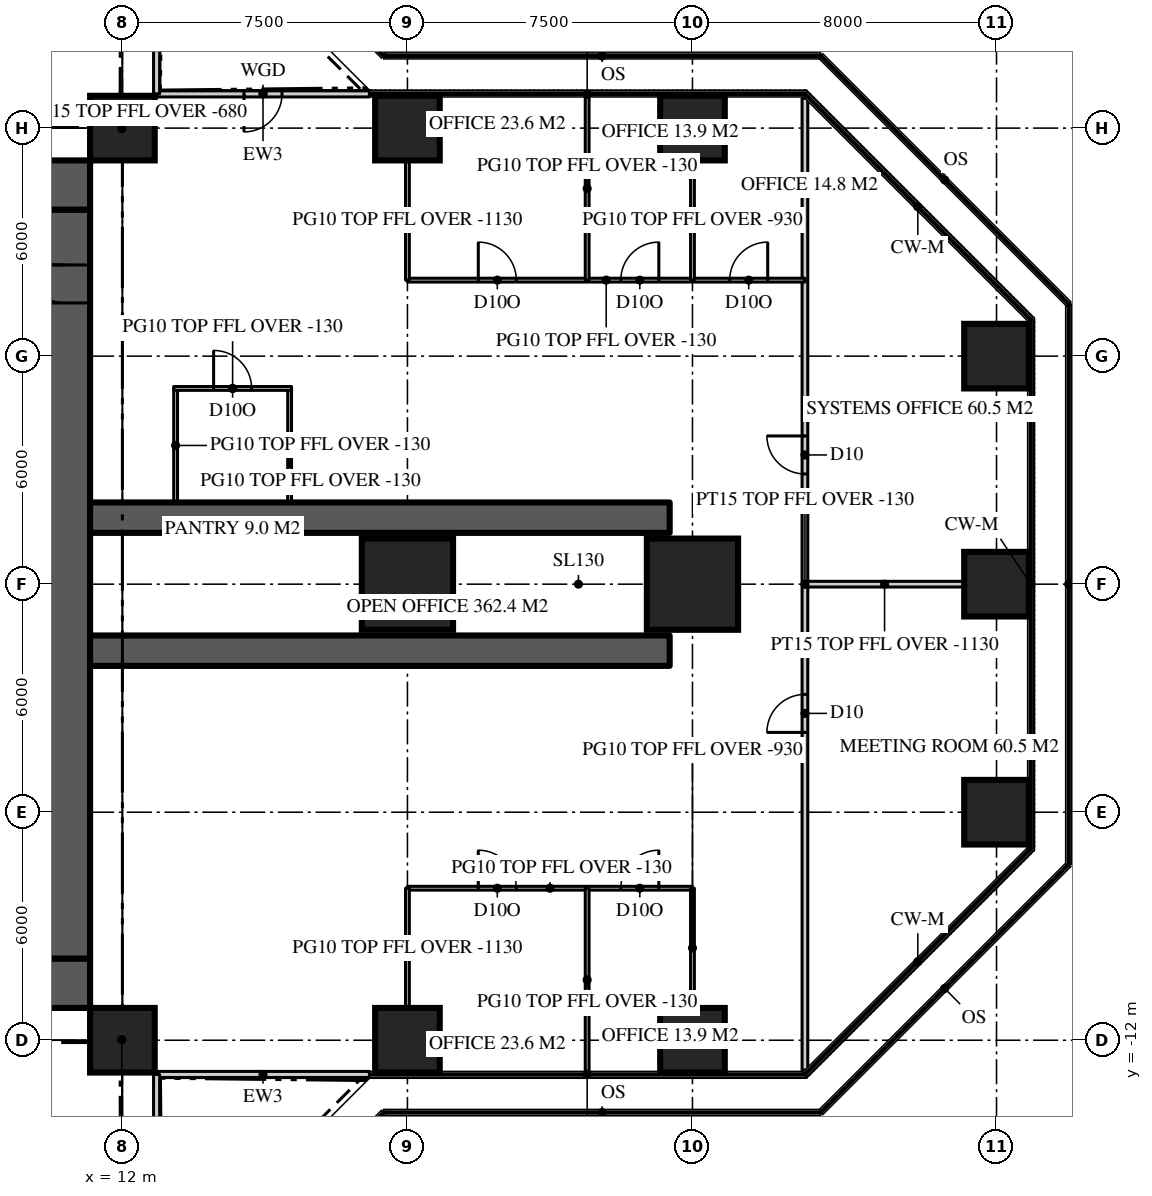
"""IFC4 building model, lengths in metres.
Left out: names, types, materials, properties, quantities, classifications, styles, units other than length and angle.
Written with IfcOpenShell. Run it as: python <this file> out.ifc"""

import sys

from ifc_helpers import new_model, si_unit, direction, frame, frame_2d, origin, origin_2d, place, context, subcontext, project, spatial, rectangle, extrude, element, fill, save


model = new_model("IFC4")
c1 = context("Model", 3, precision=1e-05, world=origin(), true_north=direction((0.0, 1.0)))
c2 = subcontext(c1, "Body", "Model", "MODEL_VIEW")
j1 = project(units=[si_unit("LENGTHUNIT", "METRE"), si_unit("PLANEANGLEUNIT", "RADIAN")], contexts=[c1])
p1 = place(None, origin())
s1 = spatial("IfcSite", under=j1, at=p1, CompositionType="ELEMENT")
p2 = place(p1, origin())
s2 = spatial("IfcBuilding", under=s1, at=p2, CompositionType="ELEMENT")
p3 = place(p2, frame((0.0, 0.0, 155.4)))
s3 = spatial("IfcBuildingStorey", under=s2, at=p3, CompositionType="ELEMENT", Elevation=155.4)
p4 = place(p3, frame((-11.15, 10.5, 0.0), z_axis=(0.0, 0.0, 1.0), x_axis=(1.0, 0.0, 0.0)))
e1 = element("IfcWall", 1, at=p4, inside=s3, PredefinedType="SHEAR", context=c2, shape_type="SweptSolid", body=[
    extrude(rectangle(XDim=22.3, YDim=1.3, at=frame_2d((11.15, 0.0))), origin(), (0.0, 0.0, 1.0), 3.9),
])
p5 = place(p4, frame((4.25, 0.0, 0.0)))
e2 = element("IfcOpeningElement", 2, at=p5, cuts=e1, PredefinedType="OPENING", context=c2, shape_type="SweptSolid", body=[
    extrude(rectangle(XDim=1.8, YDim=2.2, at=frame_2d((0.9, 1.1))), frame((0.0, 0.66, 0.0), z_axis=(0.0, -1.0, 0.0), x_axis=(1.0, 0.0, 0.0)), (0.0, 0.0, 1.0), 1.32),
])
p6 = place(p4, frame((16.25, 0.0, 0.0)))
e3 = element("IfcOpeningElement", 3, at=p6, cuts=e1, PredefinedType="OPENING", context=c2, shape_type="SweptSolid", body=[
    extrude(rectangle(XDim=1.8, YDim=2.2, at=frame_2d((0.9, 1.1))), frame((0.0, 0.66, 0.0), z_axis=(0.0, -1.0, 0.0), x_axis=(1.0, 0.0, 0.0)), (0.0, 0.0, 1.0), 1.32),
])
p7 = place(p3, frame((11.15, -10.5, 0.0), z_axis=(0.0, 0.0, 1.0), x_axis=(-1.0, 0.0, 0.0)))
e4 = element("IfcWall", 4, at=p7, inside=s3, PredefinedType="SHEAR", context=c2, shape_type="SweptSolid", body=[
    extrude(rectangle(XDim=22.3, YDim=1.3, at=frame_2d((11.15, 0.0))), origin(), (0.0, 0.0, 1.0), 3.9),
])
p8 = place(p7, frame((16.25, 0.0, 0.0)))
e5 = element("IfcOpeningElement", 5, at=p8, cuts=e4, PredefinedType="OPENING", context=c2, shape_type="SweptSolid", body=[
    extrude(rectangle(XDim=1.8, YDim=2.2, at=frame_2d((0.9, 1.1))), frame((0.0, 0.66, 0.0), z_axis=(0.0, -1.0, 0.0), x_axis=(1.0, 0.0, 0.0)), (0.0, 0.0, 1.0), 1.32),
])
p9 = place(p7, frame((4.25, 0.0, 0.0)))
e6 = element("IfcOpeningElement", 6, at=p9, cuts=e4, PredefinedType="OPENING", context=c2, shape_type="SweptSolid", body=[
    extrude(rectangle(XDim=1.8, YDim=2.2, at=frame_2d((0.9, 1.1))), frame((0.0, 0.66, 0.0), z_axis=(0.0, -1.0, 0.0), x_axis=(1.0, 0.0, 0.0)), (0.0, 0.0, 1.0), 1.32),
])
p10 = place(p3, frame((10.5, -9.85, 0.0), z_axis=(0.0, 0.0, 1.0), x_axis=(0.0, 1.0, 0.0)))
e7 = element("IfcWall", 7, at=p10, inside=s3, PredefinedType="SHEAR", context=c2, shape_type="SweptSolid", body=[
    extrude(rectangle(XDim=19.7, YDim=1.3, at=frame_2d((9.85, 0.0))), origin(), (0.0, 0.0, 1.0), 3.9),
])
p11 = place(p10, frame((17.25, 0.0, 0.0)))
e8 = element("IfcOpeningElement", 8, at=p11, cuts=e7, PredefinedType="OPENING", context=c2, shape_type="SweptSolid", body=[
    extrude(rectangle(XDim=1.0, YDim=2.2, at=frame_2d((0.5, 1.1))), frame((0.0, 0.66, 0.0), z_axis=(0.0, -1.0, 0.0), x_axis=(1.0, 0.0, 0.0)), (0.0, 0.0, 1.0), 1.32),
])
for number, where, z_axis, x_axis in (
    (9, (11.15, -1.75, 0.0), (0.0, 0.0, 1.0), (1.0, 0.0, 0.0)),
    (10, (11.15, 1.75, 0.0), (0.0, 0.0, 1.0), (1.0, 0.0, 0.0)),
):
    element("IfcWall", number, at=place(p3, frame(where, z_axis=z_axis, x_axis=x_axis)), inside=s3, PredefinedType="SHEAR", context=c2, shape_type="SweptSolid", body=[
        extrude(rectangle(XDim=15.25, YDim=0.8, at=frame_2d((7.625, 0.0))), origin(), (0.0, 0.0, 1.0), 3.9),
    ])
for number, where, z_axis, x_axis in (
    (11, (12.0, -12.0, 0.0), (0.0, 0.0, 1.0), (1.0, 0.0, 0.0)),
    (12, (19.5, -12.0, 0.0), (0.0, 0.0, 1.0), (1.0, 0.0, 0.0)),
    (13, (27.0, -12.0, 0.0), (0.0, 0.0, 1.0), (1.0, 0.0, 0.0)),
    (14, (35.0, -6.0, 0.0), (0.0, 0.0, 1.0), (1.0, 0.0, 0.0)),
):
    element("IfcColumn", number, at=place(p3, frame(where, z_axis=z_axis, x_axis=x_axis)), inside=s3, PredefinedType="COLUMN", context=c2, shape_type="SweptSolid", body=[
        extrude(rectangle(XDim=1.7, YDim=1.7, at=origin_2d()), origin(), (0.0, 0.0, 1.0), 3.9),
    ])
for number, where, z_axis, x_axis in (
    (15, (19.5, 0.0, 0.0), (0.0, 0.0, 1.0), (1.0, 0.0, 0.0)),
    (16, (27.0, 0.0, 0.0), (0.0, 0.0, 1.0), (1.0, 0.0, 0.0)),
):
    element("IfcColumn", number, at=place(p3, frame(where, z_axis=z_axis, x_axis=x_axis)), inside=s3, PredefinedType="COLUMN", context=c2, shape_type="SweptSolid", body=[
        extrude(rectangle(XDim=2.4, YDim=2.4, at=origin_2d()), origin(), (0.0, 0.0, 1.0), 3.9),
    ])
for number, where, z_axis, x_axis in (
    (17, (35.0, 0.0, 0.0), (0.0, 0.0, 1.0), (1.0, 0.0, 0.0)),
    (18, (35.0, 6.0, 0.0), (0.0, 0.0, 1.0), (1.0, 0.0, 0.0)),
    (19, (12.0, 12.0, 0.0), (0.0, 0.0, 1.0), (1.0, 0.0, 0.0)),
    (20, (19.5, 12.0, 0.0), (0.0, 0.0, 1.0), (1.0, 0.0, 0.0)),
    (21, (27.0, 12.0, 0.0), (0.0, 0.0, 1.0), (1.0, 0.0, 0.0)),
):
    element("IfcColumn", number, at=place(p3, frame(where, z_axis=z_axis, x_axis=x_axis)), inside=s3, PredefinedType="COLUMN", context=c2, shape_type="SweptSolid", body=[
        extrude(rectangle(XDim=1.7, YDim=1.7, at=origin_2d()), origin(), (0.0, 0.0, 1.0), 3.9),
    ])
p12 = place(p3, frame((12.9, -12.9, 0.0), z_axis=(0.0, 0.0, 1.0), x_axis=(1.0, 0.0, 0.0)))
e22 = element("IfcWall", 22, at=p12, inside=s3, PredefinedType="SOLIDWALL", context=c2, shape_type="SweptSolid", body=[
    extrude(rectangle(XDim=5.6, YDim=0.16, at=frame_2d((2.8, 0.0))), origin(), (0.0, 0.0, 1.0), 3.77),
])
p13 = place(p3, frame((18.5, 12.9, 0.0), z_axis=(0.0, 0.0, 1.0), x_axis=(-1.0, 0.0, 0.0)))
e23 = element("IfcWall", 23, at=p13, inside=s3, PredefinedType="SOLIDWALL", context=c2, shape_type="SweptSolid", body=[
    extrude(rectangle(XDim=5.6, YDim=0.16, at=frame_2d((2.8, 0.0))), origin(), (0.0, 0.0, 1.0), 3.77),
])
p14 = place(p13, frame((2.3, 0.0, 0.0)))
e24 = element("IfcOpeningElement", 24, at=p14, cuts=e23, PredefinedType="OPENING", context=c2, shape_type="SweptSolid", body=[
    extrude(rectangle(XDim=1.0, YDim=2.2, at=frame_2d((0.5, 1.1))), frame((0.0, 0.09, 0.0), z_axis=(0.0, -1.0, 0.0), x_axis=(1.0, 0.0, 0.0)), (0.0, 0.0, 1.0), 0.18),
])
p15 = place(p3, frame((12.9, 12.9, 0.0), z_axis=(0.0, 0.0, 1.0), x_axis=(0.0, 1.0, 0.0)))
e25 = element("IfcWall", 25, at=p15, inside=s3, PredefinedType="SOLIDWALL", context=c2, shape_type="SweptSolid", body=[
    extrude(rectangle(XDim=5.6, YDim=0.16, at=frame_2d((2.8, 0.0))), origin(), (0.0, 0.0, 1.0), 3.77),
])
p16 = place(p3, frame((12.9, -18.5, 0.0), z_axis=(0.0, 0.0, 1.0), x_axis=(0.0, 1.0, 0.0)))
e26 = element("IfcWall", 26, at=p16, inside=s3, PredefinedType="SOLIDWALL", context=c2, shape_type="SweptSolid", body=[
    extrude(rectangle(XDim=5.6, YDim=0.16, at=frame_2d((2.8, 0.0))), origin(), (0.0, 0.0, 1.0), 3.77),
])
p17 = place(p16, frame((2.3, 0.0, 0.0)))
e27 = element("IfcOpeningElement", 27, at=p17, cuts=e26, PredefinedType="OPENING", context=c2, shape_type="SweptSolid", body=[
    extrude(rectangle(XDim=1.0, YDim=2.2, at=frame_2d((0.5, 1.1))), frame((0.0, 0.09, 0.0), z_axis=(0.0, -1.0, 0.0), x_axis=(1.0, 0.0, 0.0)), (0.0, 0.0, 1.0), 0.18),
])
p18 = place(p3, frame((29.959, -12.786, 0.0), z_axis=(0.0, 0.0, 1.0), x_axis=(0.0, 1.0, 0.0)))
e28 = element("IfcWall", 28, at=p18, inside=s3, PredefinedType="PARTITIONING", context=c2, shape_type="SweptSolid", body=[
    extrude(rectangle(XDim=25.573, YDim=0.15, at=frame_2d((12.786, 0.0))), origin(), (0.0, 0.0, 1.0), 3.77),
])
p19 = place(p18, frame((15.687, 0.0, 0.0)))
e29 = element("IfcOpeningElement", 29, at=p19, cuts=e28, PredefinedType="OPENING", context=c2, shape_type="SweptSolid", body=[
    extrude(rectangle(XDim=1.0, YDim=2.2, at=frame_2d((0.5, 1.1))), frame((0.0, 0.085, 0.0), z_axis=(0.0, -1.0, 0.0), x_axis=(1.0, 0.0, 0.0)), (0.0, 0.0, 1.0), 0.17),
])
p20 = place(p18, frame((8.886, 0.0, 0.0)))
e30 = element("IfcOpeningElement", 30, at=p20, cuts=e28, PredefinedType="OPENING", context=c2, shape_type="SweptSolid", body=[
    extrude(rectangle(XDim=1.0, YDim=2.2, at=frame_2d((0.5, 1.1))), frame((0.0, 0.085, 0.0), z_axis=(0.0, -1.0, 0.0), x_axis=(1.0, 0.0, 0.0)), (0.0, 0.0, 1.0), 0.17),
])
p21 = place(p3, frame((29.959, 0.0, 0.0), z_axis=(0.0, 0.0, 1.0), x_axis=(1.0, 0.0, 0.0)))
e31 = element("IfcWall", 31, at=p21, inside=s3, PredefinedType="PARTITIONING", context=c2, shape_type="SweptSolid", body=[
    extrude(rectangle(XDim=4.191, YDim=0.15, at=frame_2d((2.095, 0.0))), origin(), (0.0, 0.0, 1.0), 2.77),
])
p22 = place(p3, frame((19.5, 8.0, 0.0), z_axis=(0.0, 0.0, 1.0), x_axis=(1.0, 0.0, 0.0)))
e32 = element("IfcWall", 32, at=p22, inside=s3, PredefinedType="PARTITIONING", context=c2, shape_type="SweptSolid", body=[
    extrude(rectangle(XDim=10.459, YDim=0.1, at=frame_2d((5.229, 0.0))), origin(), (0.0, 0.0, 1.0), 3.77),
])
p23 = place(p22, frame((1.865, 0.0, 0.0)))
e33 = element("IfcOpeningElement", 33, at=p23, cuts=e32, PredefinedType="OPENING", context=c2, shape_type="SweptSolid", body=[
    extrude(rectangle(XDim=1.0, YDim=2.2, at=frame_2d((0.5, 1.1))), frame((0.0, 0.06, 0.0), z_axis=(0.0, -1.0, 0.0), x_axis=(1.0, 0.0, 0.0)), (0.0, 0.0, 1.0), 0.12),
])
p24 = place(p22, frame((5.615, 0.0, 0.0)))
e34 = element("IfcOpeningElement", 34, at=p24, cuts=e32, PredefinedType="OPENING", context=c2, shape_type="SweptSolid", body=[
    extrude(rectangle(XDim=1.0, YDim=2.2, at=frame_2d((0.5, 1.1))), frame((0.0, 0.06, 0.0), z_axis=(0.0, -1.0, 0.0), x_axis=(1.0, 0.0, 0.0)), (0.0, 0.0, 1.0), 0.12),
])
p25 = place(p22, frame((8.479, 0.0, 0.0)))
e35 = element("IfcOpeningElement", 35, at=p25, cuts=e32, PredefinedType="OPENING", context=c2, shape_type="SweptSolid", body=[
    extrude(rectangle(XDim=1.0, YDim=2.2, at=frame_2d((0.5, 1.1))), frame((0.0, 0.06, 0.0), z_axis=(0.0, -1.0, 0.0), x_axis=(1.0, 0.0, 0.0)), (0.0, 0.0, 1.0), 0.12),
])
p26 = place(p3, frame((19.5, 8.0, 0.0), z_axis=(0.0, 0.0, 1.0), x_axis=(0.0, 1.0, 0.0)))
e36 = element("IfcWall", 36, at=p26, inside=s3, PredefinedType="PARTITIONING", context=c2, shape_type="SweptSolid", body=[
    extrude(rectangle(XDim=3.15, YDim=0.1, at=frame_2d((1.575, 0.0))), origin(), (0.0, 0.0, 1.0), 2.77),
])
p27 = place(p3, frame((24.229, 8.0, 0.0), z_axis=(0.0, 0.0, 1.0), x_axis=(0.0, 1.0, 0.0)))
e37 = element("IfcWall", 37, at=p27, inside=s3, PredefinedType="PARTITIONING", context=c2, shape_type="SweptSolid", body=[
    extrude(rectangle(XDim=4.82, YDim=0.1, at=frame_2d((2.41, 0.0))), origin(), (0.0, 0.0, 1.0), 3.77),
])
p28 = place(p3, frame((27.0, 8.0, 0.0), z_axis=(0.0, 0.0, 1.0), x_axis=(0.0, 1.0, 0.0)))
e38 = element("IfcWall", 38, at=p28, inside=s3, PredefinedType="PARTITIONING", context=c2, shape_type="SweptSolid", body=[
    extrude(rectangle(XDim=3.15, YDim=0.1, at=frame_2d((1.575, 0.0))), origin(), (0.0, 0.0, 1.0), 2.97),
])
p29 = place(p3, frame((19.5, -8.0, 0.0), z_axis=(0.0, 0.0, 1.0), x_axis=(1.0, 0.0, 0.0)))
e39 = element("IfcWall", 39, at=p29, inside=s3, PredefinedType="PARTITIONING", context=c2, shape_type="SweptSolid", body=[
    extrude(rectangle(XDim=7.5, YDim=0.1, at=frame_2d((3.75, 0.0))), origin(), (0.0, 0.0, 1.0), 3.77),
])
p30 = place(p29, frame((1.865, 0.0, 0.0)))
e40 = element("IfcOpeningElement", 40, at=p30, cuts=e39, PredefinedType="OPENING", context=c2, shape_type="SweptSolid", body=[
    extrude(rectangle(XDim=1.0, YDim=2.2, at=frame_2d((0.5, 1.1))), frame((0.0, 0.06, 0.0), z_axis=(0.0, -1.0, 0.0), x_axis=(1.0, 0.0, 0.0)), (0.0, 0.0, 1.0), 0.12),
])
p31 = place(p29, frame((5.615, 0.0, 0.0)))
e41 = element("IfcOpeningElement", 41, at=p31, cuts=e39, PredefinedType="OPENING", context=c2, shape_type="SweptSolid", body=[
    extrude(rectangle(XDim=1.0, YDim=2.2, at=frame_2d((0.5, 1.1))), frame((0.0, 0.06, 0.0), z_axis=(0.0, -1.0, 0.0), x_axis=(1.0, 0.0, 0.0)), (0.0, 0.0, 1.0), 0.12),
])
p32 = place(p3, frame((19.5, -8.0, 0.0), z_axis=(0.0, 0.0, 1.0), x_axis=(0.0, -1.0, 0.0)))
e42 = element("IfcWall", 42, at=p32, inside=s3, PredefinedType="PARTITIONING", context=c2, shape_type="SweptSolid", body=[
    extrude(rectangle(XDim=3.15, YDim=0.1, at=frame_2d((1.575, 0.0))), origin(), (0.0, 0.0, 1.0), 2.77),
])
p33 = place(p3, frame((24.229, -8.0, 0.0), z_axis=(0.0, 0.0, 1.0), x_axis=(0.0, -1.0, 0.0)))
e43 = element("IfcWall", 43, at=p33, inside=s3, PredefinedType="PARTITIONING", context=c2, shape_type="SweptSolid", body=[
    extrude(rectangle(XDim=4.82, YDim=0.1, at=frame_2d((2.41, 0.0))), origin(), (0.0, 0.0, 1.0), 3.77),
])
p34 = place(p3, frame((27.0, -8.0, 0.0), z_axis=(0.0, 0.0, 1.0), x_axis=(0.0, -1.0, 0.0)))
e44 = element("IfcWall", 44, at=p34, inside=s3, PredefinedType="PARTITIONING", context=c2, shape_type="SweptSolid", body=[
    extrude(rectangle(XDim=3.15, YDim=0.1, at=frame_2d((1.575, 0.0))), origin(), (0.0, 0.0, 1.0), 2.97),
])
for number, where, z_axis, x_axis in (
    (45, (13.4, 2.15, 0.0), (0.0, 0.0, 1.0), (0.0, 1.0, 0.0)),
    (46, (16.4, 2.15, 0.0), (0.0, 0.0, 1.0), (0.0, 1.0, 0.0)),
):
    element("IfcWall", number, at=place(p3, frame(where, z_axis=z_axis, x_axis=x_axis)), inside=s3, PredefinedType="PARTITIONING", context=c2, shape_type="SweptSolid", body=[
        extrude(rectangle(XDim=3.0, YDim=0.1, at=frame_2d((1.5, 0.0))), origin(), (0.0, 0.0, 1.0), 3.77),
    ])
p35 = place(p3, frame((13.35, 5.15, 0.0), z_axis=(0.0, 0.0, 1.0), x_axis=(1.0, 0.0, 0.0)))
e47 = element("IfcWall", 47, at=p35, inside=s3, PredefinedType="PARTITIONING", context=c2, shape_type="SweptSolid", body=[
    extrude(rectangle(XDim=3.1, YDim=0.1, at=frame_2d((1.55, 0.0))), origin(), (0.0, 0.0, 1.0), 3.77),
])
p36 = place(p35, frame((1.05, 0.0, 0.0)))
e48 = element("IfcOpeningElement", 48, at=p36, cuts=e47, PredefinedType="OPENING", context=c2, shape_type="SweptSolid", body=[
    extrude(rectangle(XDim=1.0, YDim=2.2, at=frame_2d((0.5, 1.1))), frame((0.0, 0.06, 0.0), z_axis=(0.0, -1.0, 0.0), x_axis=(1.0, 0.0, 0.0)), (0.0, 0.0, 1.0), 0.12),
])
for number, where, z_axis, x_axis in (
    (49, (11.15, 11.15, 0.0), (0.0, 0.0, 1.0), (0.707, 0.707, 0.0)),
    (50, (11.15, -11.15, 0.0), (0.0, 0.0, 1.0), (0.707, -0.707, 0.0)),
):
    element("IfcWall", number, at=place(p3, frame(where, z_axis=z_axis, x_axis=x_axis)), inside=s3, PredefinedType="PARTITIONING", context=c2, shape_type="SweptSolid", body=[
        extrude(rectangle(XDim=2.362, YDim=0.15, at=frame_2d((1.181, 0.0))), origin(), (0.0, 0.0, 1.0), 3.22),
    ])
p37 = place(p14, origin())
e51 = element("IfcDoor", 51, at=p37, inside=s3, OperationType="SINGLE_SWING_RIGHT", PredefinedType="DOOR", context=c2, shape_type="SweptSolid", body=[
    extrude(rectangle(XDim=1.0, YDim=2.2, at=frame_2d((0.5, 1.1))), frame((0.0, 0.025, 0.0), z_axis=(0.0, -1.0, 0.0), x_axis=(1.0, 0.0, 0.0)), (0.0, 0.0, 1.0), 0.05),
])
fill(e24, e51)
p38 = place(p11, origin())
e52 = element("IfcDoor", 52, at=p38, inside=s3, OperationType="SINGLE_SWING_RIGHT", PredefinedType="DOOR", context=c2, shape_type="SweptSolid", body=[
    extrude(rectangle(XDim=1.0, YDim=2.2, at=frame_2d((0.5, 1.1))), frame((0.0, 0.025, 0.0), z_axis=(0.0, -1.0, 0.0), x_axis=(1.0, 0.0, 0.0)), (0.0, 0.0, 1.0), 0.05),
])
fill(e8, e52)
p39 = place(p19, origin())
e53 = element("IfcDoor", 53, at=p39, inside=s3, OperationType="SINGLE_SWING_RIGHT", PredefinedType="DOOR", context=c2, shape_type="SweptSolid", body=[
    extrude(rectangle(XDim=1.0, YDim=2.2, at=frame_2d((0.5, 1.1))), frame((0.0, 0.025, 0.0), z_axis=(0.0, -1.0, 0.0), x_axis=(1.0, 0.0, 0.0)), (0.0, 0.0, 1.0), 0.05),
])
fill(e29, e53)
p40 = place(p20, origin())
e54 = element("IfcDoor", 54, at=p40, inside=s3, OperationType="SINGLE_SWING_LEFT", PredefinedType="DOOR", context=c2, shape_type="SweptSolid", body=[
    extrude(rectangle(XDim=1.0, YDim=2.2, at=frame_2d((0.5, 1.1))), frame((0.0, 0.025, 0.0), z_axis=(0.0, -1.0, 0.0), x_axis=(1.0, 0.0, 0.0)), (0.0, 0.0, 1.0), 0.05),
])
fill(e30, e54)
p41 = place(p23, origin())
e55 = element("IfcDoor", 55, at=p41, inside=s3, OperationType="SINGLE_SWING_LEFT", PredefinedType="DOOR", context=c2, shape_type="SweptSolid", body=[
    extrude(rectangle(XDim=1.0, YDim=2.2, at=frame_2d((0.5, 1.1))), frame((0.0, 0.025, 0.0), z_axis=(0.0, -1.0, 0.0), x_axis=(1.0, 0.0, 0.0)), (0.0, 0.0, 1.0), 0.05),
])
fill(e33, e55)
p42 = place(p24, origin())
e56 = element("IfcDoor", 56, at=p42, inside=s3, OperationType="SINGLE_SWING_RIGHT", PredefinedType="DOOR", context=c2, shape_type="SweptSolid", body=[
    extrude(rectangle(XDim=1.0, YDim=2.2, at=frame_2d((0.5, 1.1))), frame((0.0, 0.025, 0.0), z_axis=(0.0, -1.0, 0.0), x_axis=(1.0, 0.0, 0.0)), (0.0, 0.0, 1.0), 0.05),
])
fill(e34, e56)
p43 = place(p25, origin())
e57 = element("IfcDoor", 57, at=p43, inside=s3, OperationType="SINGLE_SWING_RIGHT", PredefinedType="DOOR", context=c2, shape_type="SweptSolid", body=[
    extrude(rectangle(XDim=1.0, YDim=2.2, at=frame_2d((0.5, 1.1))), frame((0.0, 0.025, 0.0), z_axis=(0.0, -1.0, 0.0), x_axis=(1.0, 0.0, 0.0)), (0.0, 0.0, 1.0), 0.05),
])
fill(e35, e57)
p44 = place(p30, origin())
e58 = element("IfcDoor", 58, at=p44, inside=s3, OperationType="SINGLE_SWING_LEFT", PredefinedType="DOOR", context=c2, shape_type="SweptSolid", body=[
    extrude(rectangle(XDim=1.0, YDim=2.2, at=frame_2d((0.5, 1.1))), frame((0.0, 0.025, 0.0), z_axis=(0.0, -1.0, 0.0), x_axis=(1.0, 0.0, 0.0)), (0.0, 0.0, 1.0), 0.05),
])
fill(e40, e58)
p45 = place(p31, origin())
e59 = element("IfcDoor", 59, at=p45, inside=s3, OperationType="SINGLE_SWING_RIGHT", PredefinedType="DOOR", context=c2, shape_type="SweptSolid", body=[
    extrude(rectangle(XDim=1.0, YDim=2.2, at=frame_2d((0.5, 1.1))), frame((0.0, 0.025, 0.0), z_axis=(0.0, -1.0, 0.0), x_axis=(1.0, 0.0, 0.0)), (0.0, 0.0, 1.0), 0.05),
])
fill(e41, e59)
p46 = place(p36, origin())
e60 = element("IfcDoor", 60, at=p46, inside=s3, OperationType="SINGLE_SWING_LEFT", PredefinedType="DOOR", context=c2, shape_type="SweptSolid", body=[
    extrude(rectangle(XDim=1.0, YDim=2.2, at=frame_2d((0.5, 1.1))), frame((0.0, 0.025, 0.0), z_axis=(0.0, -1.0, 0.0), x_axis=(1.0, 0.0, 0.0)), (0.0, 0.0, 1.0), 0.05),
])
fill(e48, e60)
save(model, sys.argv[1])
